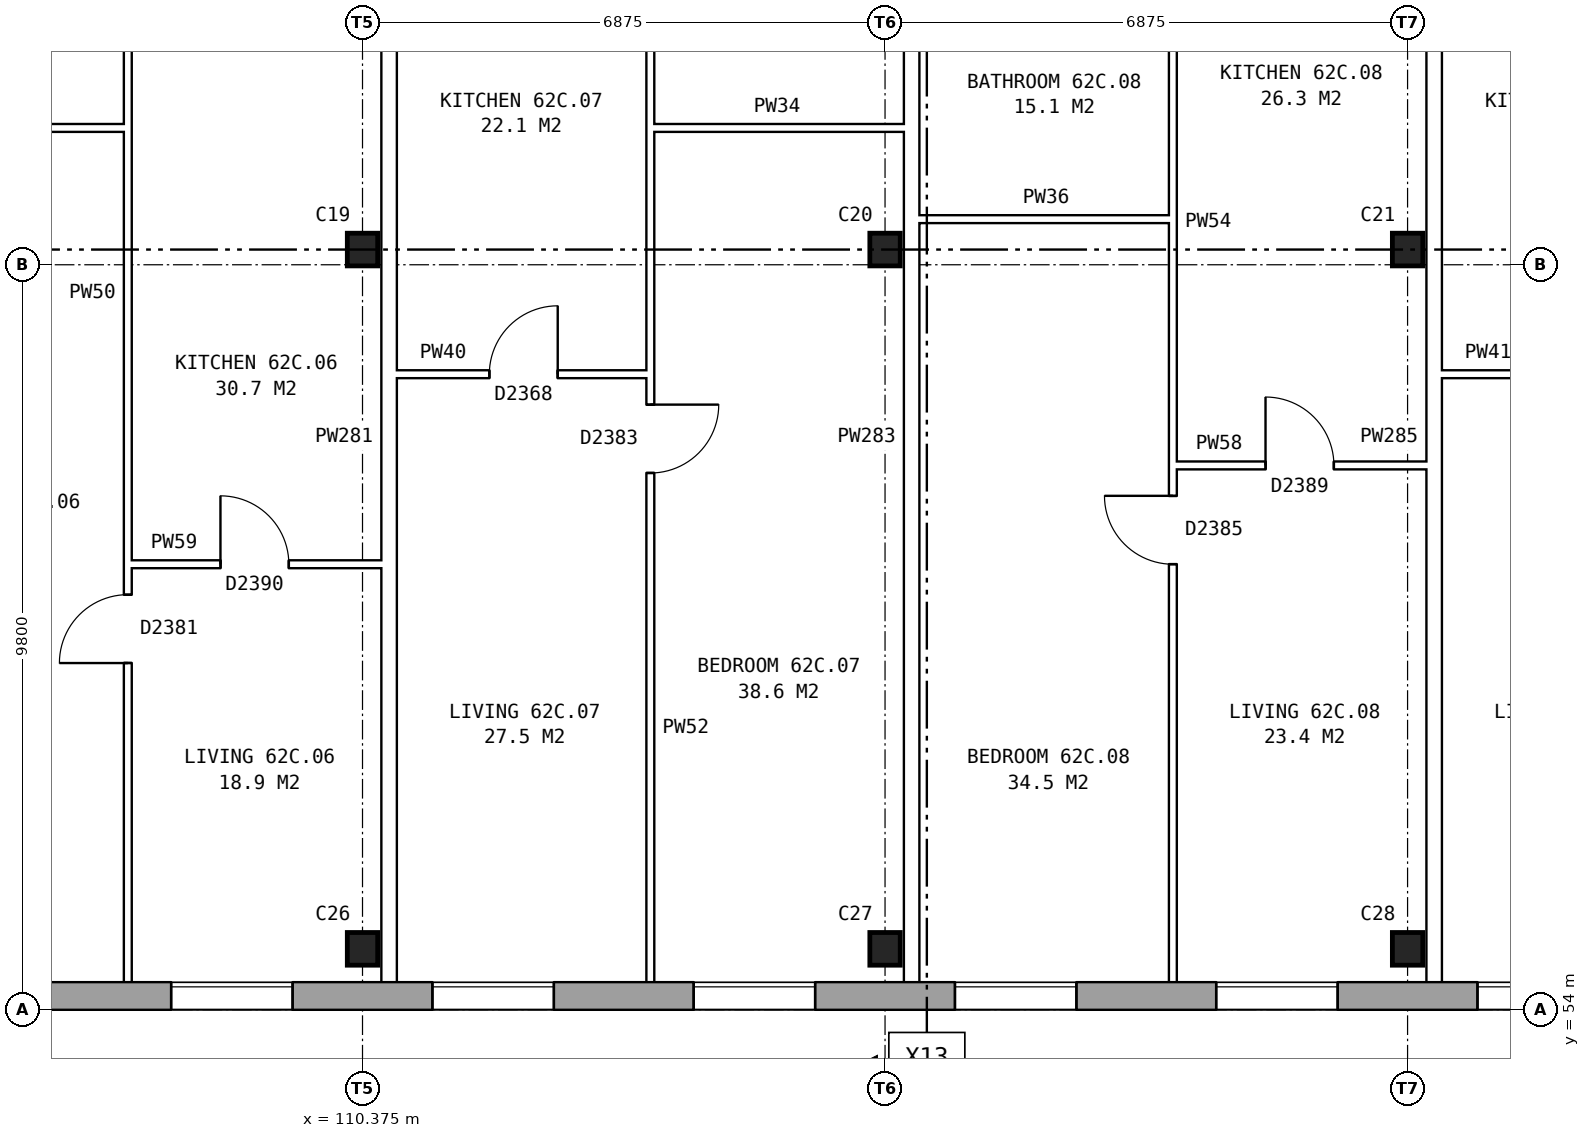
"""IFC4 building model, lengths in metres.
Left out: names, types, materials, properties, quantities, classifications, styles, units other than length and angle.
Written with IfcOpenShell. Run it as: python <this file> out.ifc"""

import sys

from ifc_helpers import new_model, si_unit, direction, frame, frame_2d, origin, origin_2d, place, context, subcontext, project, spatial, rectangle, i_section, extrude, element, fill, save


model = new_model("IFC4")
c1 = context("Model", 3, precision=1e-05, world=origin(), true_north=direction((0.0, 1.0)))
c2 = subcontext(c1, "Body", "Model", "MODEL_VIEW")
j1 = project(units=[si_unit("LENGTHUNIT", "METRE"), si_unit("PLANEANGLEUNIT", "RADIAN")], contexts=[c1])
p1 = place(None, origin())
s1 = spatial("IfcSite", under=j1, at=p1, CompositionType="ELEMENT")
p2 = place(p1, origin())
s2 = spatial("IfcBuilding", under=s1, at=p2, CompositionType="ELEMENT")
p3 = place(p2, frame((0.0, 0.0, 221.4)))
s3 = spatial("IfcBuildingStorey", under=s2, at=p3, CompositionType="ELEMENT", Elevation=221.4)
for number, where, z_axis, x_axis in (
    (1, (110.375, 54.8, 0.0), (0.0, 0.0, 1.0), (1.0, 0.0, 0.0)),
    (2, (117.25, 54.8, 0.0), (0.0, 0.0, 1.0), (1.0, 0.0, 0.0)),
    (3, (124.125, 54.8, 0.0), (0.0, 0.0, 1.0), (1.0, 0.0, 0.0)),
    (4, (110.375, 64.0, 0.0), (0.0, 0.0, 1.0), (1.0, 0.0, 0.0)),
    (5, (117.25, 64.0, 0.0), (0.0, 0.0, 1.0), (1.0, 0.0, 0.0)),
    (6, (124.125, 64.0, 0.0), (0.0, 0.0, 1.0), (1.0, 0.0, 0.0)),
):
    element("IfcColumn", number, at=place(p3, frame(where, z_axis=z_axis, x_axis=x_axis)), inside=s3, PredefinedType="COLUMN", context=c2, shape_type="SweptSolid", body=[
        extrude(i_section(OverallWidth=0.4, OverallDepth=0.43, WebThickness=0.04, FlangeThickness=0.04, at=origin_2d()), origin(), (0.0, 0.0, 1.0), 2.85),
    ])
p4 = place(p3, frame((75.95, 54.18, 0.0), z_axis=(0.0, 0.0, 1.0), x_axis=(1.0, 0.0, 0.0)))
e7 = element("IfcWall", 7, at=p4, inside=s3, PredefinedType="STANDARD", context=c2, shape_type="SweptSolid", body=[
    extrude(rectangle(XDim=55.1, YDim=0.36, at=frame_2d((27.55, 0.0))), origin(), (0.0, 0.0, 1.0), 2.85),
])
p5 = place(p4, frame((0.969, 0.0, 0.8)))
e8 = element("IfcOpeningElement", 8, at=p5, cuts=e7, PredefinedType="OPENING", context=c2, shape_type="SweptSolid", body=[
    extrude(rectangle(XDim=1.6, YDim=1.8, at=frame_2d((0.8, 0.9))), frame((0.0, 0.19, 0.0), z_axis=(0.0, -1.0, 0.0), x_axis=(1.0, 0.0, 0.0)), (0.0, 0.0, 1.0), 0.38),
])
p6 = place(p4, frame((4.406, 0.0, 0.8)))
e9 = element("IfcOpeningElement", 9, at=p6, cuts=e7, PredefinedType="OPENING", context=c2, shape_type="SweptSolid", body=[
    extrude(rectangle(XDim=1.6, YDim=1.8, at=frame_2d((0.8, 0.9))), frame((0.0, 0.19, 0.0), z_axis=(0.0, -1.0, 0.0), x_axis=(1.0, 0.0, 0.0)), (0.0, 0.0, 1.0), 0.38),
])
p7 = place(p4, frame((7.844, 0.0, 0.8)))
e10 = element("IfcOpeningElement", 10, at=p7, cuts=e7, PredefinedType="OPENING", context=c2, shape_type="SweptSolid", body=[
    extrude(rectangle(XDim=1.6, YDim=1.8, at=frame_2d((0.8, 0.9))), frame((0.0, 0.19, 0.0), z_axis=(0.0, -1.0, 0.0), x_axis=(1.0, 0.0, 0.0)), (0.0, 0.0, 1.0), 0.38),
])
p8 = place(p4, frame((11.281, 0.0, 0.8)))
e11 = element("IfcOpeningElement", 11, at=p8, cuts=e7, PredefinedType="OPENING", context=c2, shape_type="SweptSolid", body=[
    extrude(rectangle(XDim=1.6, YDim=1.8, at=frame_2d((0.8, 0.9))), frame((0.0, 0.19, 0.0), z_axis=(0.0, -1.0, 0.0), x_axis=(1.0, 0.0, 0.0)), (0.0, 0.0, 1.0), 0.38),
])
p9 = place(p4, frame((14.719, 0.0, 0.8)))
e12 = element("IfcOpeningElement", 12, at=p9, cuts=e7, PredefinedType="OPENING", context=c2, shape_type="SweptSolid", body=[
    extrude(rectangle(XDim=1.6, YDim=1.8, at=frame_2d((0.8, 0.9))), frame((0.0, 0.19, 0.0), z_axis=(0.0, -1.0, 0.0), x_axis=(1.0, 0.0, 0.0)), (0.0, 0.0, 1.0), 0.38),
])
p10 = place(p4, frame((18.156, 0.0, 0.8)))
e13 = element("IfcOpeningElement", 13, at=p10, cuts=e7, PredefinedType="OPENING", context=c2, shape_type="SweptSolid", body=[
    extrude(rectangle(XDim=1.6, YDim=1.8, at=frame_2d((0.8, 0.9))), frame((0.0, 0.19, 0.0), z_axis=(0.0, -1.0, 0.0), x_axis=(1.0, 0.0, 0.0)), (0.0, 0.0, 1.0), 0.38),
])
p11 = place(p4, frame((21.594, 0.0, 0.8)))
e14 = element("IfcOpeningElement", 14, at=p11, cuts=e7, PredefinedType="OPENING", context=c2, shape_type="SweptSolid", body=[
    extrude(rectangle(XDim=1.6, YDim=1.8, at=frame_2d((0.8, 0.9))), frame((0.0, 0.19, 0.0), z_axis=(0.0, -1.0, 0.0), x_axis=(1.0, 0.0, 0.0)), (0.0, 0.0, 1.0), 0.38),
])
p12 = place(p4, frame((25.031, 0.0, 0.8)))
e15 = element("IfcOpeningElement", 15, at=p12, cuts=e7, PredefinedType="OPENING", context=c2, shape_type="SweptSolid", body=[
    extrude(rectangle(XDim=1.6, YDim=1.8, at=frame_2d((0.8, 0.9))), frame((0.0, 0.19, 0.0), z_axis=(0.0, -1.0, 0.0), x_axis=(1.0, 0.0, 0.0)), (0.0, 0.0, 1.0), 0.38),
])
p13 = place(p4, frame((28.469, 0.0, 0.8)))
e16 = element("IfcOpeningElement", 16, at=p13, cuts=e7, PredefinedType="OPENING", context=c2, shape_type="SweptSolid", body=[
    extrude(rectangle(XDim=1.6, YDim=1.8, at=frame_2d((0.8, 0.9))), frame((0.0, 0.19, 0.0), z_axis=(0.0, -1.0, 0.0), x_axis=(1.0, 0.0, 0.0)), (0.0, 0.0, 1.0), 0.38),
])
p14 = place(p4, frame((31.906, 0.0, 0.8)))
e17 = element("IfcOpeningElement", 17, at=p14, cuts=e7, PredefinedType="OPENING", context=c2, shape_type="SweptSolid", body=[
    extrude(rectangle(XDim=1.6, YDim=1.8, at=frame_2d((0.8, 0.9))), frame((0.0, 0.19, 0.0), z_axis=(0.0, -1.0, 0.0), x_axis=(1.0, 0.0, 0.0)), (0.0, 0.0, 1.0), 0.38),
])
p15 = place(p4, frame((35.344, 0.0, 0.8)))
e18 = element("IfcOpeningElement", 18, at=p15, cuts=e7, PredefinedType="OPENING", context=c2, shape_type="SweptSolid", body=[
    extrude(rectangle(XDim=1.6, YDim=1.8, at=frame_2d((0.8, 0.9))), frame((0.0, 0.19, 0.0), z_axis=(0.0, -1.0, 0.0), x_axis=(1.0, 0.0, 0.0)), (0.0, 0.0, 1.0), 0.38),
])
p16 = place(p4, frame((38.781, 0.0, 0.8)))
e19 = element("IfcOpeningElement", 19, at=p16, cuts=e7, PredefinedType="OPENING", context=c2, shape_type="SweptSolid", body=[
    extrude(rectangle(XDim=1.6, YDim=1.8, at=frame_2d((0.8, 0.9))), frame((0.0, 0.19, 0.0), z_axis=(0.0, -1.0, 0.0), x_axis=(1.0, 0.0, 0.0)), (0.0, 0.0, 1.0), 0.38),
])
p17 = place(p4, frame((42.219, 0.0, 0.8)))
e20 = element("IfcOpeningElement", 20, at=p17, cuts=e7, PredefinedType="OPENING", context=c2, shape_type="SweptSolid", body=[
    extrude(rectangle(XDim=1.6, YDim=1.8, at=frame_2d((0.8, 0.9))), frame((0.0, 0.19, 0.0), z_axis=(0.0, -1.0, 0.0), x_axis=(1.0, 0.0, 0.0)), (0.0, 0.0, 1.0), 0.38),
])
p18 = place(p4, frame((45.656, 0.0, 0.8)))
e21 = element("IfcOpeningElement", 21, at=p18, cuts=e7, PredefinedType="OPENING", context=c2, shape_type="SweptSolid", body=[
    extrude(rectangle(XDim=1.6, YDim=1.8, at=frame_2d((0.8, 0.9))), frame((0.0, 0.19, 0.0), z_axis=(0.0, -1.0, 0.0), x_axis=(1.0, 0.0, 0.0)), (0.0, 0.0, 1.0), 0.38),
])
p19 = place(p4, frame((49.094, 0.0, 0.8)))
e22 = element("IfcOpeningElement", 22, at=p19, cuts=e7, PredefinedType="OPENING", context=c2, shape_type="SweptSolid", body=[
    extrude(rectangle(XDim=1.6, YDim=1.8, at=frame_2d((0.8, 0.9))), frame((0.0, 0.19, 0.0), z_axis=(0.0, -1.0, 0.0), x_axis=(1.0, 0.0, 0.0)), (0.0, 0.0, 1.0), 0.38),
])
p20 = place(p4, frame((52.531, 0.0, 0.8)))
e23 = element("IfcOpeningElement", 23, at=p20, cuts=e7, PredefinedType="OPENING", context=c2, shape_type="SweptSolid", body=[
    extrude(rectangle(XDim=1.6, YDim=1.8, at=frame_2d((0.8, 0.9))), frame((0.0, 0.19, 0.0), z_axis=(0.0, -1.0, 0.0), x_axis=(1.0, 0.0, 0.0)), (0.0, 0.0, 1.0), 0.38),
])
p21 = place(p3, frame((107.287, 59.86, 0.0), z_axis=(0.0, 0.0, 1.0), x_axis=(1.0, 0.0, 0.0)))
e24 = element("IfcWall", 24, at=p21, inside=s3, PredefinedType="PARTITIONING", context=c2, shape_type="SweptSolid", body=[
    extrude(rectangle(XDim=3.338, YDim=0.1, at=frame_2d((1.669, 0.0))), origin(), (0.0, 0.0, 1.0), 2.85),
])
p22 = place(p21, frame((1.219, 0.0, 0.0)))
e25 = element("IfcOpeningElement", 25, at=p22, cuts=e24, PredefinedType="OPENING", context=c2, shape_type="SweptSolid", body=[
    extrude(rectangle(XDim=0.9, YDim=2.1, at=frame_2d((0.45, 1.05))), frame((0.0, 0.06, 0.0), z_axis=(0.0, -1.0, 0.0), x_axis=(1.0, 0.0, 0.0)), (0.0, 0.0, 1.0), 0.12),
])
p23 = place(p3, frame((121.037, 61.16, 0.0), z_axis=(0.0, 0.0, 1.0), x_axis=(1.0, 0.0, 0.0)))
e26 = element("IfcWall", 26, at=p23, inside=s3, PredefinedType="PARTITIONING", context=c2, shape_type="SweptSolid", body=[
    extrude(rectangle(XDim=3.338, YDim=0.1, at=frame_2d((1.669, 0.0))), origin(), (0.0, 0.0, 1.0), 2.85),
])
p24 = place(p23, frame((1.219, 0.0, 0.0)))
e27 = element("IfcOpeningElement", 27, at=p24, cuts=e26, PredefinedType="OPENING", context=c2, shape_type="SweptSolid", body=[
    extrude(rectangle(XDim=0.9, YDim=2.1, at=frame_2d((0.45, 1.05))), frame((0.0, 0.06, 0.0), z_axis=(0.0, -1.0, 0.0), x_axis=(1.0, 0.0, 0.0)), (0.0, 0.0, 1.0), 0.12),
])
p25 = place(p3, frame((110.825, 62.36, 0.0), z_axis=(0.0, 0.0, 1.0), x_axis=(1.0, 0.0, 0.0)))
e28 = element("IfcWall", 28, at=p25, inside=s3, PredefinedType="PARTITIONING", context=c2, shape_type="SweptSolid", body=[
    extrude(rectangle(XDim=3.337, YDim=0.1, at=frame_2d((1.668, 0.0))), origin(), (0.0, 0.0, 1.0), 2.85),
])
p26 = place(p25, frame((1.219, 0.0, 0.0)))
e29 = element("IfcOpeningElement", 29, at=p26, cuts=e28, PredefinedType="OPENING", context=c2, shape_type="SweptSolid", body=[
    extrude(rectangle(XDim=0.9, YDim=2.1, at=frame_2d((0.45, 1.05))), frame((0.0, 0.06, 0.0), z_axis=(0.0, -1.0, 0.0), x_axis=(1.0, 0.0, 0.0)), (0.0, 0.0, 1.0), 0.12),
])
p27 = place(p3, frame((124.575, 62.36, 0.0), z_axis=(0.0, 0.0, 1.0), x_axis=(1.0, 0.0, 0.0)))
e30 = element("IfcWall", 30, at=p27, inside=s3, PredefinedType="PARTITIONING", context=c2, shape_type="SweptSolid", body=[
    extrude(rectangle(XDim=3.337, YDim=0.1, at=frame_2d((1.668, 0.0))), origin(), (0.0, 0.0, 1.0), 2.85),
])
p28 = place(p27, frame((1.219, 0.0, 0.0)))
e31 = element("IfcOpeningElement", 31, at=p28, cuts=e30, PredefinedType="OPENING", context=c2, shape_type="SweptSolid", body=[
    extrude(rectangle(XDim=0.9, YDim=2.1, at=frame_2d((0.45, 1.05))), frame((0.0, 0.06, 0.0), z_axis=(0.0, -1.0, 0.0), x_axis=(1.0, 0.0, 0.0)), (0.0, 0.0, 1.0), 0.12),
])
p29 = place(p3, frame((117.7, 64.4, 0.0), z_axis=(0.0, 0.0, 1.0), x_axis=(1.0, 0.0, 0.0)))
e32 = element("IfcWall", 32, at=p29, inside=s3, PredefinedType="PARTITIONING", context=c2, shape_type="SweptSolid", body=[
    extrude(rectangle(XDim=3.337, YDim=0.1, at=frame_2d((1.668, 0.0))), origin(), (0.0, 0.0, 1.0), 2.85),
])
p30 = place(p3, frame((100.412, 65.6, 0.0), z_axis=(0.0, 0.0, 1.0), x_axis=(1.0, 0.0, 0.0)))
e33 = element("IfcWall", 33, at=p30, inside=s3, PredefinedType="PARTITIONING", context=c2, shape_type="SweptSolid", body=[
    extrude(rectangle(XDim=6.875, YDim=0.1, at=frame_2d((3.438, 0.0))), origin(), (0.0, 0.0, 1.0), 2.85),
])
p31 = place(p3, frame((114.162, 65.6, 0.0), z_axis=(0.0, 0.0, 1.0), x_axis=(1.0, 0.0, 0.0)))
e34 = element("IfcWall", 34, at=p31, inside=s3, PredefinedType="PARTITIONING", context=c2, shape_type="SweptSolid", body=[
    extrude(rectangle(XDim=3.338, YDim=0.1, at=frame_2d((1.669, 0.0))), origin(), (0.0, 0.0, 1.0), 2.85),
])
p32 = place(p3, frame((107.287, 54.36, 0.0), z_axis=(0.0, 0.0, 1.0), x_axis=(0.0, 1.0, 0.0)))
e35 = element("IfcWall", 35, at=p32, inside=s3, PredefinedType="PARTITIONING", context=c2, shape_type="SweptSolid", body=[
    extrude(rectangle(XDim=14.34, YDim=0.1, at=frame_2d((7.17, 0.0))), origin(), (0.0, 0.0, 1.0), 2.85),
])
p33 = place(p32, frame((4.2, 0.0, 0.0)))
e36 = element("IfcOpeningElement", 36, at=p33, cuts=e35, PredefinedType="OPENING", context=c2, shape_type="SweptSolid", body=[
    extrude(rectangle(XDim=0.9, YDim=2.1, at=frame_2d((0.45, 1.05))), frame((0.0, 0.06, 0.0), z_axis=(0.0, -1.0, 0.0), x_axis=(1.0, 0.0, 0.0)), (0.0, 0.0, 1.0), 0.12),
])
p34 = place(p32, frame((13.04, 0.0, 0.0)))
e37 = element("IfcOpeningElement", 37, at=p34, cuts=e35, PredefinedType="OPENING", context=c2, shape_type="SweptSolid", body=[
    extrude(rectangle(XDim=0.9, YDim=2.1, at=frame_2d((0.45, 1.05))), frame((0.0, 0.06, 0.0), z_axis=(0.0, -1.0, 0.0), x_axis=(1.0, 0.0, 0.0)), (0.0, 0.0, 1.0), 0.12),
])
p35 = place(p3, frame((110.725, 54.36, 0.0), z_axis=(0.0, 0.0, 1.0), x_axis=(0.0, 1.0, 0.0)))
e38 = element("IfcWall", 38, at=p35, inside=s3, PredefinedType="PARTITIONING", context=c2, shape_type="SweptSolid", body=[
    extrude(rectangle(XDim=14.34, YDim=0.2, at=frame_2d((7.17, 0.0))), origin(), (0.0, 0.0, 1.0), 2.85),
])
p36 = place(p3, frame((114.162, 54.36, 0.0), z_axis=(0.0, 0.0, 1.0), x_axis=(0.0, 1.0, 0.0)))
e39 = element("IfcWall", 39, at=p36, inside=s3, PredefinedType="PARTITIONING", context=c2, shape_type="SweptSolid", body=[
    extrude(rectangle(XDim=14.34, YDim=0.1, at=frame_2d((7.17, 0.0))), origin(), (0.0, 0.0, 1.0), 2.85),
])
p37 = place(p36, frame((6.7, 0.0, 0.0)))
e40 = element("IfcOpeningElement", 40, at=p37, cuts=e39, PredefinedType="OPENING", context=c2, shape_type="SweptSolid", body=[
    extrude(rectangle(XDim=0.9, YDim=2.1, at=frame_2d((0.45, 1.05))), frame((0.0, 0.06, 0.0), z_axis=(0.0, -1.0, 0.0), x_axis=(1.0, 0.0, 0.0)), (0.0, 0.0, 1.0), 0.12),
])
p38 = place(p36, frame((13.04, 0.0, 0.0)))
e41 = element("IfcOpeningElement", 41, at=p38, cuts=e39, PredefinedType="OPENING", context=c2, shape_type="SweptSolid", body=[
    extrude(rectangle(XDim=0.9, YDim=2.1, at=frame_2d((0.45, 1.05))), frame((0.0, 0.06, 0.0), z_axis=(0.0, -1.0, 0.0), x_axis=(1.0, 0.0, 0.0)), (0.0, 0.0, 1.0), 0.12),
])
p39 = place(p3, frame((117.6, 54.36, 0.0), z_axis=(0.0, 0.0, 1.0), x_axis=(0.0, 1.0, 0.0)))
e42 = element("IfcWall", 42, at=p39, inside=s3, PredefinedType="PARTITIONING", context=c2, shape_type="SweptSolid", body=[
    extrude(rectangle(XDim=14.34, YDim=0.2, at=frame_2d((7.17, 0.0))), origin(), (0.0, 0.0, 1.0), 2.85),
])
p40 = place(p3, frame((121.037, 54.36, 0.0), z_axis=(0.0, 0.0, 1.0), x_axis=(0.0, 1.0, 0.0)))
e43 = element("IfcWall", 43, at=p40, inside=s3, PredefinedType="PARTITIONING", context=c2, shape_type="SweptSolid", body=[
    extrude(rectangle(XDim=14.34, YDim=0.1, at=frame_2d((7.17, 0.0))), origin(), (0.0, 0.0, 1.0), 2.85),
])
p41 = place(p40, frame((5.5, 0.0, 0.0)))
e44 = element("IfcOpeningElement", 44, at=p41, cuts=e43, PredefinedType="OPENING", context=c2, shape_type="SweptSolid", body=[
    extrude(rectangle(XDim=0.9, YDim=2.1, at=frame_2d((0.45, 1.05))), frame((0.0, 0.06, 0.0), z_axis=(0.0, -1.0, 0.0), x_axis=(1.0, 0.0, 0.0)), (0.0, 0.0, 1.0), 0.12),
])
p42 = place(p40, frame((13.04, 0.0, 0.0)))
e45 = element("IfcOpeningElement", 45, at=p42, cuts=e43, PredefinedType="OPENING", context=c2, shape_type="SweptSolid", body=[
    extrude(rectangle(XDim=0.9, YDim=2.1, at=frame_2d((0.45, 1.05))), frame((0.0, 0.06, 0.0), z_axis=(0.0, -1.0, 0.0), x_axis=(1.0, 0.0, 0.0)), (0.0, 0.0, 1.0), 0.12),
])
p43 = place(p3, frame((124.475, 54.36, 0.0), z_axis=(0.0, 0.0, 1.0), x_axis=(0.0, 1.0, 0.0)))
e46 = element("IfcWall", 46, at=p43, inside=s3, PredefinedType="PARTITIONING", context=c2, shape_type="SweptSolid", body=[
    extrude(rectangle(XDim=14.34, YDim=0.2, at=frame_2d((7.17, 0.0))), origin(), (0.0, 0.0, 1.0), 2.85),
])
p44 = place(p14, origin())
e47 = element("IfcWindow", 47, at=p44, inside=s3, PartitioningType="SINGLE_PANEL", PredefinedType="WINDOW", context=c2, shape_type="SweptSolid", body=[
    extrude(rectangle(XDim=1.6, YDim=1.8, at=frame_2d((0.8, 0.9))), frame((0.0, 0.15, 0.0), z_axis=(0.0, -1.0, 0.0), x_axis=(1.0, 0.0, 0.0)), (0.0, 0.0, 1.0), 0.06),
])
fill(e17, e47)
p45 = place(p15, origin())
e48 = element("IfcWindow", 48, at=p45, inside=s3, PartitioningType="SINGLE_PANEL", PredefinedType="WINDOW", context=c2, shape_type="SweptSolid", body=[
    extrude(rectangle(XDim=1.6, YDim=1.8, at=frame_2d((0.8, 0.9))), frame((0.0, 0.15, 0.0), z_axis=(0.0, -1.0, 0.0), x_axis=(1.0, 0.0, 0.0)), (0.0, 0.0, 1.0), 0.06),
])
fill(e18, e48)
p46 = place(p16, origin())
e49 = element("IfcWindow", 49, at=p46, inside=s3, PartitioningType="SINGLE_PANEL", PredefinedType="WINDOW", context=c2, shape_type="SweptSolid", body=[
    extrude(rectangle(XDim=1.6, YDim=1.8, at=frame_2d((0.8, 0.9))), frame((0.0, 0.15, 0.0), z_axis=(0.0, -1.0, 0.0), x_axis=(1.0, 0.0, 0.0)), (0.0, 0.0, 1.0), 0.06),
])
fill(e19, e49)
p47 = place(p17, origin())
e50 = element("IfcWindow", 50, at=p47, inside=s3, PartitioningType="SINGLE_PANEL", PredefinedType="WINDOW", context=c2, shape_type="SweptSolid", body=[
    extrude(rectangle(XDim=1.6, YDim=1.8, at=frame_2d((0.8, 0.9))), frame((0.0, 0.15, 0.0), z_axis=(0.0, -1.0, 0.0), x_axis=(1.0, 0.0, 0.0)), (0.0, 0.0, 1.0), 0.06),
])
fill(e20, e50)
p48 = place(p18, origin())
e51 = element("IfcWindow", 51, at=p48, inside=s3, PartitioningType="SINGLE_PANEL", PredefinedType="WINDOW", context=c2, shape_type="SweptSolid", body=[
    extrude(rectangle(XDim=1.6, YDim=1.8, at=frame_2d((0.8, 0.9))), frame((0.0, 0.15, 0.0), z_axis=(0.0, -1.0, 0.0), x_axis=(1.0, 0.0, 0.0)), (0.0, 0.0, 1.0), 0.06),
])
fill(e21, e51)
p49 = place(p19, origin())
e52 = element("IfcWindow", 52, at=p49, inside=s3, PartitioningType="SINGLE_PANEL", PredefinedType="WINDOW", context=c2, shape_type="SweptSolid", body=[
    extrude(rectangle(XDim=1.6, YDim=1.8, at=frame_2d((0.8, 0.9))), frame((0.0, 0.15, 0.0), z_axis=(0.0, -1.0, 0.0), x_axis=(1.0, 0.0, 0.0)), (0.0, 0.0, 1.0), 0.06),
])
fill(e22, e52)
p50 = place(p33, origin())
e53 = element("IfcDoor", 53, at=p50, inside=s3, OperationType="SINGLE_SWING_LEFT", PredefinedType="DOOR", context=c2, shape_type="SweptSolid", body=[
    extrude(rectangle(XDim=0.9, YDim=2.1, at=frame_2d((0.45, 1.05))), frame((0.0, 0.025, 0.0), z_axis=(0.0, -1.0, 0.0), x_axis=(1.0, 0.0, 0.0)), (0.0, 0.0, 1.0), 0.05),
])
fill(e36, e53)
p51 = place(p22, origin())
e54 = element("IfcDoor", 54, at=p51, inside=s3, OperationType="SINGLE_SWING_LEFT", PredefinedType="DOOR", context=c2, shape_type="SweptSolid", body=[
    extrude(rectangle(XDim=0.9, YDim=2.1, at=frame_2d((0.45, 1.05))), frame((0.0, 0.025, 0.0), z_axis=(0.0, -1.0, 0.0), x_axis=(1.0, 0.0, 0.0)), (0.0, 0.0, 1.0), 0.05),
])
fill(e25, e54)
p52 = place(p37, frame((0.9, 0.0, 0.0), z_axis=(0.0, 0.0, 1.0), x_axis=(-1.0, 0.0, 0.0)))
e55 = element("IfcDoor", 55, at=p52, inside=s3, OperationType="SINGLE_SWING_LEFT", PredefinedType="DOOR", context=c2, shape_type="SweptSolid", body=[
    extrude(rectangle(XDim=0.9, YDim=2.1, at=frame_2d((0.45, 1.05))), frame((0.0, 0.025, 0.0), z_axis=(0.0, -1.0, 0.0), x_axis=(1.0, 0.0, 0.0)), (0.0, 0.0, 1.0), 0.05),
])
fill(e40, e55)
p53 = place(p26, origin())
e56 = element("IfcDoor", 56, at=p53, inside=s3, OperationType="SINGLE_SWING_RIGHT", PredefinedType="DOOR", context=c2, shape_type="SweptSolid", body=[
    extrude(rectangle(XDim=0.9, YDim=2.1, at=frame_2d((0.45, 1.05))), frame((0.0, 0.025, 0.0), z_axis=(0.0, -1.0, 0.0), x_axis=(1.0, 0.0, 0.0)), (0.0, 0.0, 1.0), 0.05),
])
fill(e29, e56)
p54 = place(p41, origin())
e57 = element("IfcDoor", 57, at=p54, inside=s3, OperationType="SINGLE_SWING_RIGHT", PredefinedType="DOOR", context=c2, shape_type="SweptSolid", body=[
    extrude(rectangle(XDim=0.9, YDim=2.1, at=frame_2d((0.45, 1.05))), frame((0.0, 0.025, 0.0), z_axis=(0.0, -1.0, 0.0), x_axis=(1.0, 0.0, 0.0)), (0.0, 0.0, 1.0), 0.05),
])
fill(e44, e57)
p55 = place(p24, origin())
e58 = element("IfcDoor", 58, at=p55, inside=s3, OperationType="SINGLE_SWING_LEFT", PredefinedType="DOOR", context=c2, shape_type="SweptSolid", body=[
    extrude(rectangle(XDim=0.9, YDim=2.1, at=frame_2d((0.45, 1.05))), frame((0.0, 0.025, 0.0), z_axis=(0.0, -1.0, 0.0), x_axis=(1.0, 0.0, 0.0)), (0.0, 0.0, 1.0), 0.05),
])
fill(e27, e58)
save(model, sys.argv[1])
